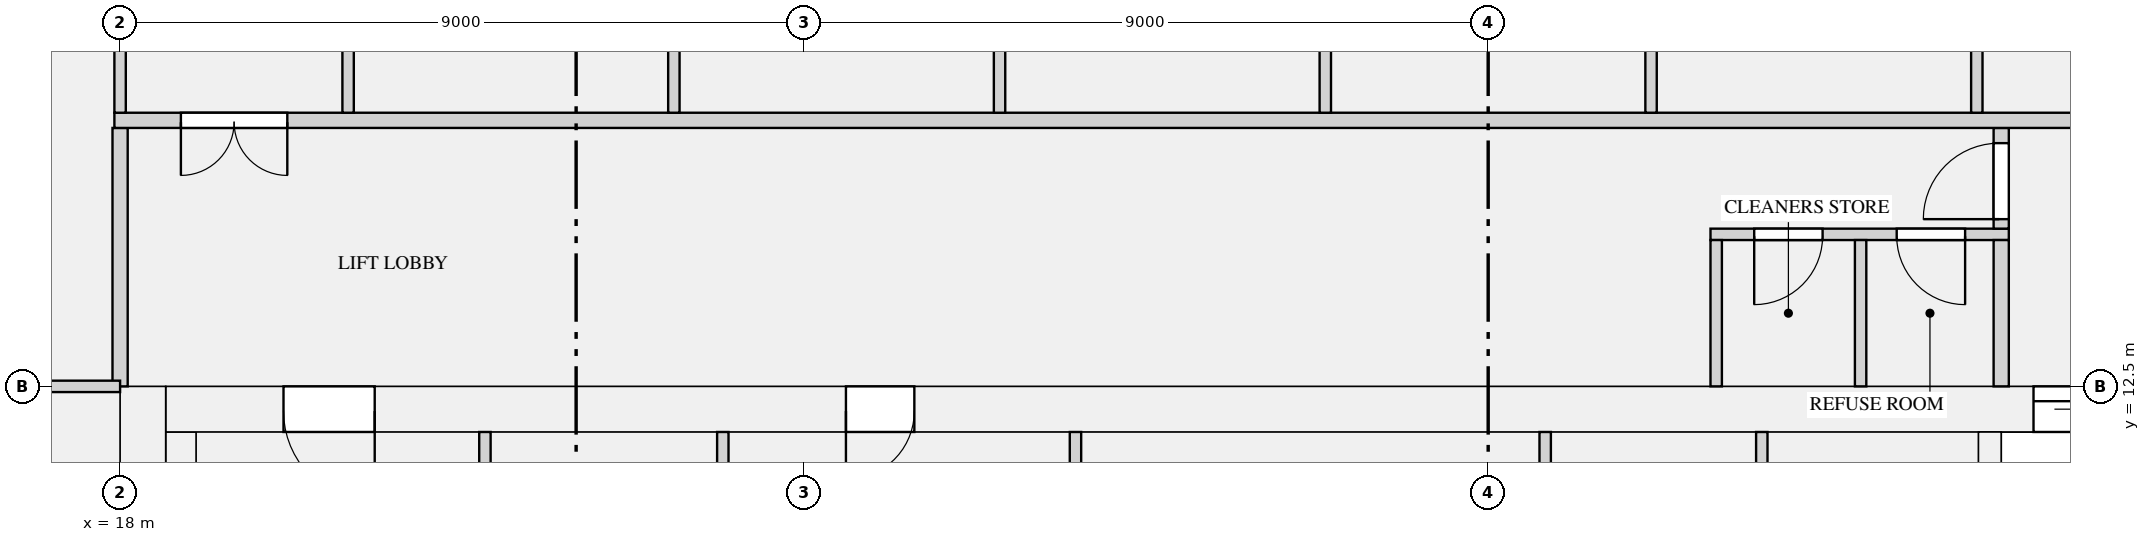
"""IFC4 building model, lengths in metres.
Left out: names, types, materials, properties, quantities, classifications, styles, units other than length and angle.
Written with IfcOpenShell. Run it as: python <this file> out.ifc"""

import sys

from ifc_helpers import new_model, si_unit, direction, frame, frame_2d, origin, place, context, subcontext, project, spatial, rectangle, extrude, element, fill, save


model = new_model("IFC4")
c1 = context("Model", 3, precision=1e-05, world=origin(), true_north=direction((0.0, 1.0)))
c2 = subcontext(c1, "Body", "Model", "MODEL_VIEW")
j1 = project(units=[si_unit("LENGTHUNIT", "METRE"), si_unit("PLANEANGLEUNIT", "RADIAN")], contexts=[c1])
p1 = place(None, origin())
s1 = spatial("IfcSite", under=j1, at=p1, CompositionType="ELEMENT")
p2 = place(p1, origin())
s2 = spatial("IfcBuilding", under=s1, at=p2, CompositionType="ELEMENT")
p3 = place(p2, frame((0.0, 0.0, 216.9)))
s3 = spatial("IfcBuildingStorey", under=s2, at=p3, CompositionType="ELEMENT", Elevation=216.9)
p4 = place(p3, frame((18.3, 0.0, 0.0), z_axis=(0.0, 0.0, 1.0), x_axis=(0.0, 1.0, 0.0)))
e1 = element("IfcWall", 1, at=p4, inside=s3, PredefinedType="SHEAR", context=c2, shape_type="SweptSolid", body=[
    extrude(rectangle(XDim=12.5, YDim=0.6, at=frame_2d((6.25, 0.0))), origin(), (0.0, 0.0, 1.0), 3.15),
])
p5 = place(p3, frame((18.6, 12.2, 0.0), z_axis=(0.0, 0.0, 1.0), x_axis=(1.0, 0.0, 0.0)))
e2 = element("IfcWall", 2, at=p5, inside=s3, PredefinedType="SHEAR", context=c2, shape_type="SweptSolid", body=[
    extrude(rectangle(XDim=34.8, YDim=0.6, at=frame_2d((17.4, 0.0))), origin(), (0.0, 0.0, 1.0), 3.15),
])
p6 = place(p5, frame((24.575, 0.0, 0.0)))
e3 = element("IfcOpeningElement", 3, at=p6, cuts=e2, PredefinedType="OPENING", context=c2, shape_type="SweptSolid", body=[
    extrude(rectangle(XDim=1.1, YDim=2.1, at=frame_2d((0.55, 1.05))), frame((0.0, 0.31, 0.0), z_axis=(0.0, -1.0, 0.0), x_axis=(1.0, 0.0, 0.0)), (0.0, 0.0, 1.0), 0.62),
])
p7 = place(p5, frame((26.825, 0.0, 0.0)))
e4 = element("IfcOpeningElement", 4, at=p7, cuts=e2, PredefinedType="OPENING", context=c2, shape_type="SweptSolid", body=[
    extrude(rectangle(XDim=1.1, YDim=2.1, at=frame_2d((0.55, 1.05))), frame((0.0, 0.31, 0.0), z_axis=(0.0, -1.0, 0.0), x_axis=(1.0, 0.0, 0.0)), (0.0, 0.0, 1.0), 0.62),
])
p8 = place(p5, frame((29.075, 0.0, 0.0)))
e5 = element("IfcOpeningElement", 5, at=p8, cuts=e2, PredefinedType="OPENING", context=c2, shape_type="SweptSolid", body=[
    extrude(rectangle(XDim=1.1, YDim=2.1, at=frame_2d((0.55, 1.05))), frame((0.0, 0.31, 0.0), z_axis=(0.0, -1.0, 0.0), x_axis=(1.0, 0.0, 0.0)), (0.0, 0.0, 1.0), 0.62),
])
p9 = place(p5, frame((8.95, 0.0, 0.0)))
e6 = element("IfcOpeningElement", 6, at=p9, cuts=e2, PredefinedType="OPENING", context=c2, shape_type="SweptSolid", body=[
    extrude(rectangle(XDim=0.9, YDim=2.1, at=frame_2d((0.45, 1.05))), frame((0.0, 0.31, 0.0), z_axis=(0.0, -1.0, 0.0), x_axis=(1.0, 0.0, 0.0)), (0.0, 0.0, 1.0), 0.62),
])
p10 = place(p5, frame((1.55, 0.0, 0.0)))
e7 = element("IfcOpeningElement", 7, at=p10, cuts=e2, PredefinedType="OPENING", context=c2, shape_type="SweptSolid", body=[
    extrude(rectangle(XDim=1.2, YDim=2.1, at=frame_2d((0.6, 1.05))), frame((0.0, 0.31, 0.0), z_axis=(0.0, -1.0, 0.0), x_axis=(1.0, 0.0, 0.0)), (0.0, 0.0, 1.0), 0.62),
])
p11 = place(p5, frame((32.05, 0.0, 0.0)))
e8 = element("IfcOpeningElement", 8, at=p11, cuts=e2, PredefinedType="OPENING", context=c2, shape_type="SweptSolid", body=[
    extrude(rectangle(XDim=1.2, YDim=2.1, at=frame_2d((0.6, 1.05))), frame((0.0, 0.31, 0.0), z_axis=(0.0, -1.0, 0.0), x_axis=(1.0, 0.0, 0.0)), (0.0, 0.0, 1.0), 0.62),
])
p12 = place(p3, frame((18.8, 1.0, 0.0), z_axis=(0.0, 0.0, 1.0), x_axis=(0.0, 1.0, 0.0)))
e9 = element("IfcWall", 9, at=p12, inside=s3, PredefinedType="SHEAR", context=c2, shape_type="SweptSolid", body=[
    extrude(rectangle(XDim=10.9, YDim=0.4, at=frame_2d((5.45, 0.0))), origin(), (0.0, 0.0, 1.0), 3.15),
])
p13 = place(p3, frame((42.6, 8.25, 0.0), z_axis=(0.0, 0.0, 1.0), x_axis=(0.0, 1.0, 0.0)))
e10 = element("IfcWall", 10, at=p13, inside=s3, PredefinedType="SHEAR", context=c2, shape_type="SweptSolid", body=[
    extrude(rectangle(XDim=3.65, YDim=0.3, at=frame_2d((1.825, 0.0))), origin(), (0.0, 0.0, 1.0), 3.15),
])
p14 = place(p3, frame((38.925, 14.5, 0.0), z_axis=(0.0, 0.0, 1.0), x_axis=(1.0, 0.0, 0.0)))
e11 = element("IfcWall", 11, at=p14, inside=s3, PredefinedType="PARTITIONING", context=c2, shape_type="SweptSolid", body=[
    extrude(rectangle(XDim=3.925, YDim=0.15, at=frame_2d((1.962, 0.0))), origin(), (0.0, 0.0, 1.0), 2.83),
])
p15 = place(p14, frame((0.575, 0.0, 0.0)))
e12 = element("IfcOpeningElement", 12, at=p15, cuts=e11, PredefinedType="OPENING", context=c2, shape_type="SweptSolid", body=[
    extrude(rectangle(XDim=0.9, YDim=2.1, at=frame_2d((0.45, 1.05))), frame((0.0, 0.085, 0.0), z_axis=(0.0, -1.0, 0.0), x_axis=(1.0, 0.0, 0.0)), (0.0, 0.0, 1.0), 0.17),
])
p16 = place(p14, frame((2.45, 0.0, 0.0)))
e13 = element("IfcOpeningElement", 13, at=p16, cuts=e11, PredefinedType="OPENING", context=c2, shape_type="SweptSolid", body=[
    extrude(rectangle(XDim=0.9, YDim=2.1, at=frame_2d((0.45, 1.05))), frame((0.0, 0.085, 0.0), z_axis=(0.0, -1.0, 0.0), x_axis=(1.0, 0.0, 0.0)), (0.0, 0.0, 1.0), 0.17),
])
for number, where, z_axis, x_axis in (
    (14, (22.8, 6.725, 0.0), (0.0, 0.0, 1.0), (0.0, 1.0, 0.0)),
    (15, (36.75, 6.725, 0.0), (0.0, 0.0, 1.0), (0.0, 1.0, 0.0)),
    (16, (39.6, 6.725, 0.0), (0.0, 0.0, 1.0), (0.0, 1.0, 0.0)),
):
    element("IfcWall", number, at=place(p3, frame(where, z_axis=z_axis, x_axis=x_axis)), inside=s3, PredefinedType="PARTITIONING", context=c2, shape_type="SweptSolid", body=[
        extrude(rectangle(XDim=5.175, YDim=0.15, at=frame_2d((2.587, 0.0))), origin(), (0.0, 0.0, 1.0), 2.83),
    ])
for number, where, z_axis, x_axis in (
    (17, (25.93, 9.805, 0.0), (0.0, 0.0, 1.0), (0.0, 1.0, 0.0)),
    (18, (30.57, 9.805, 0.0), (0.0, 0.0, 1.0), (0.0, 1.0, 0.0)),
):
    element("IfcWall", number, at=place(p3, frame(where, z_axis=z_axis, x_axis=x_axis)), inside=s3, PredefinedType="PARTITIONING", context=c2, shape_type="SweptSolid", body=[
        extrude(rectangle(XDim=2.095, YDim=0.15, at=frame_2d((1.047, 0.0))), origin(), (0.0, 0.0, 1.0), 2.83),
    ])
p17 = place(p3, frame((18.0, 12.5, 0.0), z_axis=(0.0, 0.0, 1.0), x_axis=(0.0, 1.0, 0.0)))
e19 = element("IfcWall", 19, at=p17, inside=s3, PredefinedType="PARTITIONING", context=c2, shape_type="SweptSolid", body=[
    extrude(rectangle(XDim=3.4, YDim=0.2, at=frame_2d((1.7, 0.0))), origin(), (0.0, 0.0, 1.0), 2.83),
])
for number, where, z_axis, x_axis in (
    (20, (39.0, 12.5, 0.0), (0.0, 0.0, 1.0), (0.0, 1.0, 0.0)),
    (21, (40.9, 12.5, 0.0), (0.0, 0.0, 1.0), (0.0, 1.0, 0.0)),
):
    element("IfcWall", number, at=place(p3, frame(where, z_axis=z_axis, x_axis=x_axis)), inside=s3, PredefinedType="PARTITIONING", context=c2, shape_type="SweptSolid", body=[
        extrude(rectangle(XDim=1.925, YDim=0.15, at=frame_2d((0.962, 0.0))), origin(), (0.0, 0.0, 1.0), 2.83),
    ])
p18 = place(p3, frame((42.75, 12.5, 0.0), z_axis=(0.0, 0.0, 1.0), x_axis=(0.0, 1.0, 0.0)))
e22 = element("IfcWall", 22, at=p18, inside=s3, PredefinedType="PARTITIONING", context=c2, shape_type="SweptSolid", body=[
    extrude(rectangle(XDim=1.925, YDim=0.2, at=frame_2d((0.962, 0.0))), origin(), (0.0, 0.0, 1.0), 2.83),
])
p19 = place(p3, frame((42.75, 14.575, 0.0), z_axis=(0.0, 0.0, 1.0), x_axis=(0.0, 1.0, 0.0)))
e23 = element("IfcWall", 23, at=p19, inside=s3, PredefinedType="PARTITIONING", context=c2, shape_type="SweptSolid", body=[
    extrude(rectangle(XDim=1.325, YDim=0.2, at=frame_2d((0.663, 0.0))), origin(), (0.0, 0.0, 1.0), 2.83),
])
p20 = place(p19, frame((0.125, 0.0, 0.0)))
e24 = element("IfcOpeningElement", 24, at=p20, cuts=e23, PredefinedType="OPENING", context=c2, shape_type="SweptSolid", body=[
    extrude(rectangle(XDim=1.0, YDim=2.1, at=frame_2d((0.5, 1.05))), frame((0.0, 0.11, 0.0), z_axis=(0.0, -1.0, 0.0), x_axis=(1.0, 0.0, 0.0)), (0.0, 0.0, 1.0), 0.22),
])
p21 = place(p3, frame((9.65, 12.5, 0.0), z_axis=(0.0, 0.0, 1.0), x_axis=(1.0, 0.0, 0.0)))
e25 = element("IfcWall", 25, at=p21, inside=s3, PredefinedType="PARTITIONING", context=c2, shape_type="SweptSolid", body=[
    extrude(rectangle(XDim=8.35, YDim=0.15, at=frame_2d((4.175, 0.0))), origin(), (0.0, 0.0, 1.0), 2.83),
])
p22 = place(p21, frame((3.65, 0.0, 0.0)))
e26 = element("IfcOpeningElement", 26, at=p22, cuts=e25, PredefinedType="OPENING", context=c2, shape_type="SweptSolid", body=[
    extrude(rectangle(XDim=0.9, YDim=2.1, at=frame_2d((0.45, 1.05))), frame((0.0, 0.085, 0.0), z_axis=(0.0, -1.0, 0.0), x_axis=(1.0, 0.0, 0.0)), (0.0, 0.0, 1.0), 0.17),
])
p23 = place(p3, frame((17.925, 16.0, 0.0), z_axis=(0.0, 0.0, 1.0), x_axis=(1.0, 0.0, 0.0)))
e27 = element("IfcWall", 27, at=p23, inside=s3, PredefinedType="PARTITIONING", context=c2, shape_type="SweptSolid", body=[
    extrude(rectangle(XDim=36.175, YDim=0.2, at=frame_2d((18.087, 0.0))), origin(), (0.0, 0.0, 1.0), 2.83),
])
p24 = place(p23, frame((0.875, 0.0, 0.0)))
e28 = element("IfcOpeningElement", 28, at=p24, cuts=e27, PredefinedType="OPENING", context=c2, shape_type="SweptSolid", body=[
    extrude(rectangle(XDim=1.4, YDim=2.1, at=frame_2d((0.7, 1.05))), frame((0.0, 0.11, 0.0), z_axis=(0.0, -1.0, 0.0), x_axis=(1.0, 0.0, 0.0)), (0.0, 0.0, 1.0), 0.22),
])
p25 = place(p23, frame((33.875, 0.0, 0.0)))
e29 = element("IfcOpeningElement", 29, at=p25, cuts=e27, PredefinedType="OPENING", context=c2, shape_type="SweptSolid", body=[
    extrude(rectangle(XDim=1.4, YDim=2.1, at=frame_2d((0.7, 1.05))), frame((0.0, 0.11, 0.0), z_axis=(0.0, -1.0, 0.0), x_axis=(1.0, 0.0, 0.0)), (0.0, 0.0, 1.0), 0.22),
])
p26 = place(p3, frame((18.0, 16.1, 0.0), z_axis=(0.0, 0.0, 1.0), x_axis=(0.0, 1.0, 0.0)))
e30 = element("IfcWall", 30, at=p26, inside=s3, PredefinedType="PARTITIONING", context=c2, shape_type="SweptSolid", body=[
    extrude(rectangle(XDim=7.825, YDim=0.15, at=frame_2d((3.913, 0.0))), origin(), (0.0, 0.0, 1.0), 2.83),
])
p27 = place(p26, frame((1.65, 0.0, 0.0)))
e31 = element("IfcOpeningElement", 31, at=p27, cuts=e30, PredefinedType="OPENING", context=c2, shape_type="SweptSolid", body=[
    extrude(rectangle(XDim=1.5, YDim=2.1, at=frame_2d((0.75, 1.05))), frame((0.0, 0.085, 0.0), z_axis=(0.0, -1.0, 0.0), x_axis=(1.0, 0.0, 0.0)), (0.0, 0.0, 1.0), 0.17),
])
p28 = place(p26, frame((5.25, 0.0, 0.0)))
e32 = element("IfcOpeningElement", 32, at=p28, cuts=e30, PredefinedType="OPENING", context=c2, shape_type="SweptSolid", body=[
    extrude(rectangle(XDim=0.9, YDim=2.1, at=frame_2d((0.45, 1.05))), frame((0.0, 0.085, 0.0), z_axis=(0.0, -1.0, 0.0), x_axis=(1.0, 0.0, 0.0)), (0.0, 0.0, 1.0), 0.17),
])
p29 = place(p3, frame((21.0, 16.1, 0.0), z_axis=(0.0, 0.0, 1.0), x_axis=(0.0, 1.0, 0.0)))
e33 = element("IfcWall", 33, at=p29, inside=s3, PredefinedType="PARTITIONING", context=c2, shape_type="SweptSolid", body=[
    extrude(rectangle(XDim=4.825, YDim=0.15, at=frame_2d((2.413, 0.0))), origin(), (0.0, 0.0, 1.0), 2.83),
])
p30 = place(p29, frame((1.95, 0.0, 0.0)))
e34 = element("IfcOpeningElement", 34, at=p30, cuts=e33, PredefinedType="OPENING", context=c2, shape_type="SweptSolid", body=[
    extrude(rectangle(XDim=0.9, YDim=2.1, at=frame_2d((0.45, 1.05))), frame((0.0, 0.085, 0.0), z_axis=(0.0, -1.0, 0.0), x_axis=(1.0, 0.0, 0.0)), (0.0, 0.0, 1.0), 0.17),
])
for number, where, z_axis, x_axis in (
    (35, (25.286, 16.1, 0.0), (0.0, 0.0, 1.0), (0.0, 1.0, 0.0)),
    (36, (29.571, 16.1, 0.0), (0.0, 0.0, 1.0), (0.0, 1.0, 0.0)),
    (37, (33.857, 16.1, 0.0), (0.0, 0.0, 1.0), (0.0, 1.0, 0.0)),
    (38, (38.143, 16.1, 0.0), (0.0, 0.0, 1.0), (0.0, 1.0, 0.0)),
    (39, (42.429, 16.1, 0.0), (0.0, 0.0, 1.0), (0.0, 1.0, 0.0)),
):
    element("IfcWall", number, at=place(p3, frame(where, z_axis=z_axis, x_axis=x_axis)), inside=s3, PredefinedType="PARTITIONING", context=c2, shape_type="SweptSolid", body=[
        extrude(rectangle(XDim=4.825, YDim=0.15, at=frame_2d((2.413, 0.0))), origin(), (0.0, 0.0, 1.0), 2.83),
    ])
p31 = place(p6, origin())
e40 = element("IfcDoor", 40, at=p31, inside=s3, OperationType="DOUBLE_DOOR_SLIDING", PredefinedType="DOOR", context=c2, shape_type="SweptSolid", body=[
    extrude(rectangle(XDim=1.1, YDim=2.1, at=frame_2d((0.55, 1.05))), frame((0.0, 0.025, 0.0), z_axis=(0.0, -1.0, 0.0), x_axis=(1.0, 0.0, 0.0)), (0.0, 0.0, 1.0), 0.05),
])
fill(e3, e40)
p32 = place(p15, frame((0.9, 0.0, 0.0), z_axis=(0.0, 0.0, 1.0), x_axis=(-1.0, 0.0, 0.0)))
e41 = element("IfcDoor", 41, at=p32, inside=s3, OperationType="SINGLE_SWING_RIGHT", PredefinedType="DOOR", context=c2, shape_type="SweptSolid", body=[
    extrude(rectangle(XDim=0.9, YDim=2.1, at=frame_2d((0.45, 1.05))), frame((0.0, 0.025, 0.0), z_axis=(0.0, -1.0, 0.0), x_axis=(1.0, 0.0, 0.0)), (0.0, 0.0, 1.0), 0.05),
])
fill(e12, e41)
p33 = place(p16, frame((0.9, 0.0, 0.0), z_axis=(0.0, 0.0, 1.0), x_axis=(-1.0, 0.0, 0.0)))
e42 = element("IfcDoor", 42, at=p33, inside=s3, OperationType="SINGLE_SWING_LEFT", PredefinedType="DOOR", context=c2, shape_type="SweptSolid", body=[
    extrude(rectangle(XDim=0.9, YDim=2.1, at=frame_2d((0.45, 1.05))), frame((0.0, 0.025, 0.0), z_axis=(0.0, -1.0, 0.0), x_axis=(1.0, 0.0, 0.0)), (0.0, 0.0, 1.0), 0.05),
])
fill(e13, e42)
p34 = place(p9, frame((0.9, 0.0, 0.0), z_axis=(0.0, 0.0, 1.0), x_axis=(-1.0, 0.0, 0.0)))
e43 = element("IfcDoor", 43, at=p34, inside=s3, OperationType="SINGLE_SWING_RIGHT", PredefinedType="DOOR", context=c2, shape_type="SweptSolid", body=[
    extrude(rectangle(XDim=0.9, YDim=2.1, at=frame_2d((0.45, 1.05))), frame((0.0, 0.025, 0.0), z_axis=(0.0, -1.0, 0.0), x_axis=(1.0, 0.0, 0.0)), (0.0, 0.0, 1.0), 0.05),
])
fill(e6, e43)
p35 = place(p10, frame((1.2, 0.0, 0.0), z_axis=(0.0, 0.0, 1.0), x_axis=(-1.0, 0.0, 0.0)))
e44 = element("IfcDoor", 44, at=p35, inside=s3, OperationType="SINGLE_SWING_LEFT", PredefinedType="DOOR", context=c2, shape_type="SweptSolid", body=[
    extrude(rectangle(XDim=1.2, YDim=2.1, at=frame_2d((0.6, 1.05))), frame((0.0, 0.025, 0.0), z_axis=(0.0, -1.0, 0.0), x_axis=(1.0, 0.0, 0.0)), (0.0, 0.0, 1.0), 0.05),
])
fill(e7, e44)
p36 = place(p20, origin())
e45 = element("IfcDoor", 45, at=p36, inside=s3, OperationType="SINGLE_SWING_LEFT", PredefinedType="DOOR", context=c2, shape_type="SweptSolid", body=[
    extrude(rectangle(XDim=1.0, YDim=2.1, at=frame_2d((0.5, 1.05))), frame((0.0, 0.025, 0.0), z_axis=(0.0, -1.0, 0.0), x_axis=(1.0, 0.0, 0.0)), (0.0, 0.0, 1.0), 0.05),
])
fill(e24, e45)
p37 = place(p24, frame((1.4, 0.0, 0.0), z_axis=(0.0, 0.0, 1.0), x_axis=(-1.0, 0.0, 0.0)))
e46 = element("IfcDoor", 46, at=p37, inside=s3, OperationType="DOUBLE_DOOR_SINGLE_SWING", PredefinedType="DOOR", context=c2, shape_type="SweptSolid", body=[
    extrude(rectangle(XDim=1.4, YDim=2.1, at=frame_2d((0.7, 1.05))), frame((0.0, 0.025, 0.0), z_axis=(0.0, -1.0, 0.0), x_axis=(1.0, 0.0, 0.0)), (0.0, 0.0, 1.0), 0.05),
])
fill(e28, e46)
save(model, sys.argv[1])
